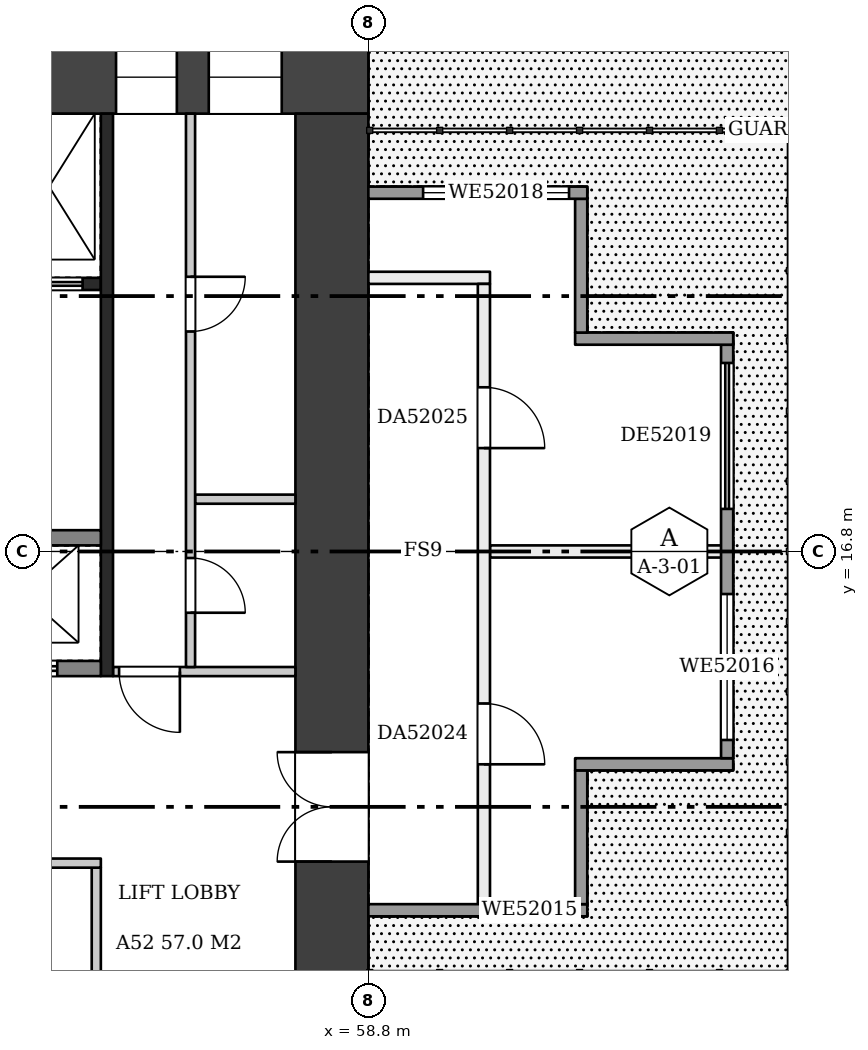
"""IFC4 building model, lengths in metres.
Left out: names, types, materials, properties, quantities, classifications, styles, units other than length and angle.
Written with IfcOpenShell. Run it as: python <this file> out.ifc"""

import sys

from ifc_helpers import new_model, si_unit, direction, frame, frame_2d, origin, place, context, subcontext, project, spatial, rectangle, extrude, element, fill, save


model = new_model("IFC4")
c1 = context("Model", 3, precision=1e-05, world=origin(), true_north=direction((0.0, 1.0)))
c2 = subcontext(c1, "Body", "Model", "MODEL_VIEW")
j1 = project(units=[si_unit("LENGTHUNIT", "METRE"), si_unit("PLANEANGLEUNIT", "RADIAN")], contexts=[c1])
p1 = place(None, origin())
s1 = spatial("IfcSite", under=j1, at=p1, CompositionType="ELEMENT")
p2 = place(p1, origin())
s2 = spatial("IfcBuilding", under=s1, at=p2, CompositionType="ELEMENT")
p3 = place(p2, frame((0.0, 0.0, 200.2)))
s3 = spatial("IfcBuildingStorey", under=s2, at=p3, CompositionType="ELEMENT", Elevation=200.2)
p4 = place(p3, frame((42.0, 24.6, 0.0), z_axis=(0.0, 0.0, 1.0), x_axis=(1.0, 0.0, 0.0)))
e1 = element("IfcWall", 1, at=p4, inside=s3, PredefinedType="SHEAR", context=c2, shape_type="SweptSolid", body=[
    extrude(rectangle(XDim=16.8, YDim=1.2, at=frame_2d((8.4, 0.0))), origin(), (0.0, 0.0, 1.0), 3.22),
])
p5 = place(p4, frame((1.8, 0.0, 0.5)))
e2 = element("IfcOpeningElement", 2, at=p5, cuts=e1, PredefinedType="OPENING", context=c2, shape_type="SweptSolid", body=[
    extrude(rectangle(XDim=1.8, YDim=2.4, at=frame_2d((0.9, 1.2))), frame((0.0, 0.61, 0.0), z_axis=(0.0, -1.0, 0.0), x_axis=(1.0, 0.0, 0.0)), (0.0, 0.0, 1.0), 1.22),
])
p6 = place(p4, frame((4.625, 0.0, 1.6)))
e3 = element("IfcOpeningElement", 3, at=p6, cuts=e1, PredefinedType="OPENING", context=c2, shape_type="SweptSolid", body=[
    extrude(rectangle(XDim=1.8, YDim=1.2, at=frame_2d((0.9, 0.6))), frame((0.0, 0.61, 0.0), z_axis=(0.0, -1.0, 0.0), x_axis=(1.0, 0.0, 0.0)), (0.0, 0.0, 1.0), 1.22),
])
p7 = place(p4, frame((7.05, 0.0, 1.6)))
e4 = element("IfcOpeningElement", 4, at=p7, cuts=e1, PredefinedType="OPENING", context=c2, shape_type="SweptSolid", body=[
    extrude(rectangle(XDim=1.2, YDim=1.2, at=frame_2d((0.6, 0.6))), frame((0.0, 0.61, 0.0), z_axis=(0.0, -1.0, 0.0), x_axis=(1.0, 0.0, 0.0)), (0.0, 0.0, 1.0), 1.22),
])
p8 = place(p4, frame((12.65, 0.0, 0.6)))
e5 = element("IfcOpeningElement", 5, at=p8, cuts=e1, PredefinedType="OPENING", context=c2, shape_type="SweptSolid", body=[
    extrude(rectangle(XDim=1.0, YDim=2.1, at=frame_2d((0.5, 1.05))), frame((0.0, 0.61, 0.0), z_axis=(0.0, -1.0, 0.0), x_axis=(1.0, 0.0, 0.0)), (0.0, 0.0, 1.0), 1.22),
])
p9 = place(p4, frame((14.175, 0.0, 1.6)))
e6 = element("IfcOpeningElement", 6, at=p9, cuts=e1, PredefinedType="OPENING", context=c2, shape_type="SweptSolid", body=[
    extrude(rectangle(XDim=1.2, YDim=1.2, at=frame_2d((0.6, 0.6))), frame((0.0, 0.61, 0.0), z_axis=(0.0, -1.0, 0.0), x_axis=(1.0, 0.0, 0.0)), (0.0, 0.0, 1.0), 1.22),
])
p10 = place(p3, frame((58.2, 9.6, 0.0), z_axis=(0.0, 0.0, 1.0), x_axis=(0.0, 1.0, 0.0)))
e7 = element("IfcWall", 7, at=p10, inside=s3, PredefinedType="SHEAR", context=c2, shape_type="SweptSolid", body=[
    extrude(rectangle(XDim=14.4, YDim=1.2, at=frame_2d((7.2, 0.0))), origin(), (0.0, 0.0, 1.0), 3.22),
])
p11 = place(p10, frame((2.1, 0.0, 0.0)))
e8 = element("IfcOpeningElement", 8, at=p11, cuts=e7, PredefinedType="OPENING", context=c2, shape_type="SweptSolid", body=[
    extrude(rectangle(XDim=1.8, YDim=2.1, at=frame_2d((0.9, 1.05))), frame((0.0, 0.61, 0.0), z_axis=(0.0, -1.0, 0.0), x_axis=(1.0, 0.0, 0.0)), (0.0, 0.0, 1.0), 1.22),
])
p12 = place(p3, frame((54.325, 9.6, 0.0), z_axis=(0.0, 0.0, 1.0), x_axis=(0.0, 1.0, 0.0)))
e9 = element("IfcWall", 9, at=p12, inside=s3, PredefinedType="PARTITIONING", context=c2, shape_type="SweptSolid", body=[
    extrude(rectangle(XDim=2.0, YDim=0.15, at=frame_2d((1.0, 0.0))), origin(), (0.0, 0.0, 1.0), 3.22),
])
p13 = place(p3, frame((46.4, 11.675, 0.0), z_axis=(0.0, 0.0, 1.0), x_axis=(1.0, 0.0, 0.0)))
e10 = element("IfcWall", 10, at=p13, inside=s3, PredefinedType="PARTITIONING", context=c2, shape_type="SweptSolid", body=[
    extrude(rectangle(XDim=8.0, YDim=0.15, at=frame_2d((4.0, 0.0))), origin(), (0.0, 0.0, 1.0), 3.22),
])
p14 = place(p13, frame((1.21, 0.0, 0.0)))
e11 = element("IfcOpeningElement", 11, at=p14, cuts=e10, PredefinedType="OPENING", context=c2, shape_type="SweptSolid", body=[
    extrude(rectangle(XDim=0.9, YDim=2.1, at=frame_2d((0.45, 1.05))), frame((0.0, 0.085, 0.0), z_axis=(0.0, -1.0, 0.0), x_axis=(1.0, 0.0, 0.0)), (0.0, 0.0, 1.0), 0.17),
])
p15 = place(p13, frame((5.135, 0.0, 0.0)))
e12 = element("IfcOpeningElement", 12, at=p15, cuts=e10, PredefinedType="OPENING", context=c2, shape_type="SweptSolid", body=[
    extrude(rectangle(XDim=0.9, YDim=2.1, at=frame_2d((0.45, 1.05))), frame((0.0, 0.085, 0.0), z_axis=(0.0, -1.0, 0.0), x_axis=(1.0, 0.0, 0.0)), (0.0, 0.0, 1.0), 0.17),
])
p16 = place(p3, frame((46.4, 14.875, 0.0), z_axis=(0.0, 0.0, 1.0), x_axis=(1.0, 0.0, 0.0)))
e13 = element("IfcWall", 13, at=p16, inside=s3, PredefinedType="SHEAR", context=c2, shape_type="SweptSolid", body=[
    extrude(rectangle(XDim=8.0, YDim=0.25, at=frame_2d((4.0, 0.0))), origin(), (0.0, 0.0, 1.0), 3.22),
])
p17 = place(p16, frame((0.717, 0.0, 0.0)))
e14 = element("IfcOpeningElement", 14, at=p17, cuts=e13, PredefinedType="OPENING", context=c2, shape_type="SweptSolid", body=[
    extrude(rectangle(XDim=1.1, YDim=2.1, at=frame_2d((0.55, 1.05))), frame((0.0, 0.135, 0.0), z_axis=(0.0, -1.0, 0.0), x_axis=(1.0, 0.0, 0.0)), (0.0, 0.0, 1.0), 0.27),
])
p18 = place(p16, frame((3.45, 0.0, 0.0)))
e15 = element("IfcOpeningElement", 15, at=p18, cuts=e13, PredefinedType="OPENING", context=c2, shape_type="SweptSolid", body=[
    extrude(rectangle(XDim=1.1, YDim=2.1, at=frame_2d((0.55, 1.05))), frame((0.0, 0.135, 0.0), z_axis=(0.0, -1.0, 0.0), x_axis=(1.0, 0.0, 0.0)), (0.0, 0.0, 1.0), 0.27),
])
p19 = place(p16, frame((6.183, 0.0, 0.0)))
e16 = element("IfcOpeningElement", 16, at=p19, cuts=e13, PredefinedType="OPENING", context=c2, shape_type="SweptSolid", body=[
    extrude(rectangle(XDim=1.1, YDim=2.1, at=frame_2d((0.55, 1.05))), frame((0.0, 0.135, 0.0), z_axis=(0.0, -1.0, 0.0), x_axis=(1.0, 0.0, 0.0)), (0.0, 0.0, 1.0), 0.27),
])
p20 = place(p3, frame((46.4, 17.025, 0.0), z_axis=(0.0, 0.0, 1.0), x_axis=(1.0, 0.0, 0.0)))
e17 = element("IfcWall", 17, at=p20, inside=s3, PredefinedType="SHEAR", context=c2, shape_type="SweptSolid", body=[
    extrude(rectangle(XDim=8.0, YDim=0.25, at=frame_2d((4.0, 0.0))), origin(), (0.0, 0.0, 1.0), 3.22),
])
p21 = place(p3, frame((46.4, 21.2, 0.0), z_axis=(0.0, 0.0, 1.0), x_axis=(1.0, 0.0, 0.0)))
e18 = element("IfcWall", 18, at=p21, inside=s3, PredefinedType="SHEAR", context=c2, shape_type="SweptSolid", body=[
    extrude(rectangle(XDim=8.0, YDim=0.2, at=frame_2d((4.0, 0.0))), origin(), (0.0, 0.0, 1.0), 3.22),
])
p22 = place(p21, frame((0.675, 0.0, 0.0)))
e19 = element("IfcOpeningElement", 19, at=p22, cuts=e18, PredefinedType="OPENING", context=c2, shape_type="SweptSolid", body=[
    extrude(rectangle(XDim=0.9, YDim=2.1, at=frame_2d((0.45, 1.05))), frame((0.0, 0.11, 0.0), z_axis=(0.0, -1.0, 0.0), x_axis=(1.0, 0.0, 0.0)), (0.0, 0.0, 1.0), 0.22),
])
p23 = place(p21, frame((2.7, 0.0, 0.0)))
e20 = element("IfcOpeningElement", 20, at=p23, cuts=e18, PredefinedType="OPENING", context=c2, shape_type="SweptSolid", body=[
    extrude(rectangle(XDim=0.9, YDim=2.1, at=frame_2d((0.45, 1.05))), frame((0.0, 0.11, 0.0), z_axis=(0.0, -1.0, 0.0), x_axis=(1.0, 0.0, 0.0)), (0.0, 0.0, 1.0), 0.22),
])
p24 = place(p21, frame((4.55, 0.0, 0.0)))
e21 = element("IfcOpeningElement", 21, at=p24, cuts=e18, PredefinedType="OPENING", context=c2, shape_type="SweptSolid", body=[
    extrude(rectangle(XDim=1.1, YDim=2.1, at=frame_2d((0.55, 1.05))), frame((0.0, 0.11, 0.0), z_axis=(0.0, -1.0, 0.0), x_axis=(1.0, 0.0, 0.0)), (0.0, 0.0, 1.0), 0.22),
])
p25 = place(p21, frame((6.6, 0.0, 0.0)))
e22 = element("IfcOpeningElement", 22, at=p25, cuts=e18, PredefinedType="OPENING", context=c2, shape_type="SweptSolid", body=[
    extrude(rectangle(XDim=1.1, YDim=2.1, at=frame_2d((0.55, 1.05))), frame((0.0, 0.11, 0.0), z_axis=(0.0, -1.0, 0.0), x_axis=(1.0, 0.0, 0.0)), (0.0, 0.0, 1.0), 0.22),
])
p26 = place(p3, frame((54.5, 14.75, 0.0), z_axis=(0.0, 0.0, 1.0), x_axis=(0.0, 1.0, 0.0)))
e23 = element("IfcWall", 23, at=p26, inside=s3, PredefinedType="SHEAR", context=c2, shape_type="SweptSolid", body=[
    extrude(rectangle(XDim=9.25, YDim=0.2, at=frame_2d((4.625, 0.0))), origin(), (0.0, 0.0, 1.0), 3.22),
])
p27 = place(p3, frame((54.6, 14.825, 0.0), z_axis=(0.0, 0.0, 1.0), x_axis=(1.0, 0.0, 0.0)))
e24 = element("IfcWall", 24, at=p27, inside=s3, PredefinedType="PARTITIONING", context=c2, shape_type="SweptSolid", body=[
    extrude(rectangle(XDim=3.0, YDim=0.15, at=frame_2d((1.5, 0.0))), origin(), (0.0, 0.0, 1.0), 3.22),
])
p28 = place(p27, frame((0.1, 0.0, 0.0)))
e25 = element("IfcOpeningElement", 25, at=p28, cuts=e24, PredefinedType="OPENING", context=c2, shape_type="SweptSolid", body=[
    extrude(rectangle(XDim=1.0, YDim=2.1, at=frame_2d((0.5, 1.05))), frame((0.0, 0.085, 0.0), z_axis=(0.0, -1.0, 0.0), x_axis=(1.0, 0.0, 0.0)), (0.0, 0.0, 1.0), 0.17),
])
p29 = place(p3, frame((55.95, 17.66, 0.0), z_axis=(0.0, 0.0, 1.0), x_axis=(1.0, 0.0, 0.0)))
e26 = element("IfcWall", 26, at=p29, inside=s3, PredefinedType="PARTITIONING", context=c2, shape_type="SweptSolid", body=[
    extrude(rectangle(XDim=1.65, YDim=0.15, at=frame_2d((0.825, 0.0))), origin(), (0.0, 0.0, 1.0), 3.22),
])
p30 = place(p3, frame((55.875, 14.9, 0.0), z_axis=(0.0, 0.0, 1.0), x_axis=(0.0, 1.0, 0.0)))
e27 = element("IfcWall", 27, at=p30, inside=s3, PredefinedType="PARTITIONING", context=c2, shape_type="SweptSolid", body=[
    extrude(rectangle(XDim=9.1, YDim=0.15, at=frame_2d((4.55, 0.0))), origin(), (0.0, 0.0, 1.0), 3.22),
])
p31 = place(p30, frame((0.893, 0.0, 0.0)))
e28 = element("IfcOpeningElement", 28, at=p31, cuts=e27, PredefinedType="OPENING", context=c2, shape_type="SweptSolid", body=[
    extrude(rectangle(XDim=0.9, YDim=2.1, at=frame_2d((0.45, 1.05))), frame((0.0, 0.085, 0.0), z_axis=(0.0, -1.0, 0.0), x_axis=(1.0, 0.0, 0.0)), (0.0, 0.0, 1.0), 0.17),
])
p32 = place(p30, frame((5.518, 0.0, 0.0)))
e29 = element("IfcOpeningElement", 29, at=p32, cuts=e27, PredefinedType="OPENING", context=c2, shape_type="SweptSolid", body=[
    extrude(rectangle(XDim=0.9, YDim=2.1, at=frame_2d((0.45, 1.05))), frame((0.0, 0.085, 0.0), z_axis=(0.0, -1.0, 0.0), x_axis=(1.0, 0.0, 0.0)), (0.0, 0.0, 1.0), 0.17),
])
p33 = place(p3, frame((60.8, 16.8, 0.0), z_axis=(0.0, 0.0, 1.0), x_axis=(1.0, 0.0, 0.0)))
e30 = element("IfcWall", 30, at=p33, inside=s3, PredefinedType="PARTITIONING", context=c2, shape_type="SweptSolid", body=[
    extrude(rectangle(XDim=3.9, YDim=0.2, at=frame_2d((1.95, 0.0))), origin(), (0.0, 0.0, 1.0), 3.22),
])
p34 = place(p3, frame((58.8, 21.3, 0.0), z_axis=(0.0, 0.0, 1.0), x_axis=(1.0, 0.0, 0.0)))
e31 = element("IfcWall", 31, at=p34, inside=s3, PredefinedType="PARTITIONING", context=c2, shape_type="SweptSolid", body=[
    extrude(rectangle(XDim=2.0, YDim=0.2, at=frame_2d((1.0, 0.0))), origin(), (0.0, 0.0, 1.0), 3.22),
])
p35 = place(p3, frame((60.7, 10.9, 0.0), z_axis=(0.0, 0.0, 1.0), x_axis=(0.0, 1.0, 0.0)))
e32 = element("IfcWall", 32, at=p35, inside=s3, PredefinedType="PARTITIONING", context=c2, shape_type="SweptSolid", body=[
    extrude(rectangle(XDim=10.3, YDim=0.2, at=frame_2d((5.15, 0.0))), origin(), (0.0, 0.0, 1.0), 3.22),
])
p36 = place(p35, frame((2.4, 0.0, 0.0)))
e33 = element("IfcOpeningElement", 33, at=p36, cuts=e32, PredefinedType="OPENING", context=c2, shape_type="SweptSolid", body=[
    extrude(rectangle(XDim=1.0, YDim=2.1, at=frame_2d((0.5, 1.05))), frame((0.0, 0.11, 0.0), z_axis=(0.0, -1.0, 0.0), x_axis=(1.0, 0.0, 0.0)), (0.0, 0.0, 1.0), 0.22),
])
p37 = place(p35, frame((7.6, 0.0, 0.0)))
e34 = element("IfcOpeningElement", 34, at=p37, cuts=e32, PredefinedType="OPENING", context=c2, shape_type="SweptSolid", body=[
    extrude(rectangle(XDim=1.0, YDim=2.1, at=frame_2d((0.5, 1.05))), frame((0.0, 0.11, 0.0), z_axis=(0.0, -1.0, 0.0), x_axis=(1.0, 0.0, 0.0)), (0.0, 0.0, 1.0), 0.22),
])
p38 = place(p3, frame((58.8, 10.9, 0.0), z_axis=(0.0, 0.0, 1.0), x_axis=(1.0, 0.0, 0.0)))
e35 = element("IfcWall", 35, at=p38, inside=s3, PredefinedType="SOLIDWALL", context=c2, shape_type="SweptSolid", body=[
    extrude(rectangle(XDim=3.6, YDim=0.2, at=frame_2d((1.8, 0.0))), origin(), (0.0, 0.0, 1.0), 3.22),
])
p39 = place(p38, frame((2.0, 0.0, 0.9)))
e36 = element("IfcOpeningElement", 36, at=p39, cuts=e35, PredefinedType="OPENING", context=c2, shape_type="SweptSolid", body=[
    extrude(rectangle(XDim=1.3, YDim=1.5, at=frame_2d((0.65, 0.75))), frame((0.0, 0.11, 0.0), z_axis=(0.0, -1.0, 0.0), x_axis=(1.0, 0.0, 0.0)), (0.0, 0.0, 1.0), 0.22),
])
p40 = place(p3, frame((62.3, 11.0, 0.0), z_axis=(0.0, 0.0, 1.0), x_axis=(0.0, 1.0, 0.0)))
e37 = element("IfcWall", 37, at=p40, inside=s3, PredefinedType="SOLIDWALL", context=c2, shape_type="SweptSolid", body=[
    extrude(rectangle(XDim=2.2, YDim=0.2, at=frame_2d((1.1, 0.0))), origin(), (0.0, 0.0, 1.0), 3.22),
])
p41 = place(p3, frame((62.2, 13.3, 0.0), z_axis=(0.0, 0.0, 1.0), x_axis=(1.0, 0.0, 0.0)))
e38 = element("IfcWall", 38, at=p41, inside=s3, PredefinedType="SOLIDWALL", context=c2, shape_type="SweptSolid", body=[
    extrude(rectangle(XDim=2.6, YDim=0.2, at=frame_2d((1.3, 0.0))), origin(), (0.0, 0.0, 1.0), 3.22),
])
p42 = place(p3, frame((64.7, 13.4, 0.0), z_axis=(0.0, 0.0, 1.0), x_axis=(0.0, 1.0, 0.0)))
e39 = element("IfcWall", 39, at=p42, inside=s3, PredefinedType="SOLIDWALL", context=c2, shape_type="SweptSolid", body=[
    extrude(rectangle(XDim=6.8, YDim=0.2, at=frame_2d((3.4, 0.0))), origin(), (0.0, 0.0, 1.0), 3.22),
])
p43 = place(p42, frame((0.3, 0.0, 0.9)))
e40 = element("IfcOpeningElement", 40, at=p43, cuts=e39, PredefinedType="OPENING", context=c2, shape_type="SweptSolid", body=[
    extrude(rectangle(XDim=2.4, YDim=1.5, at=frame_2d((1.2, 0.75))), frame((0.0, 0.11, 0.0), z_axis=(0.0, -1.0, 0.0), x_axis=(1.0, 0.0, 0.0)), (0.0, 0.0, 1.0), 0.22),
])
p44 = place(p42, frame((4.1, 0.0, 0.0)))
e41 = element("IfcOpeningElement", 41, at=p44, cuts=e39, PredefinedType="OPENING", context=c2, shape_type="SweptSolid", body=[
    extrude(rectangle(XDim=2.4, YDim=2.2, at=frame_2d((1.2, 1.1))), frame((0.0, 0.11, 0.0), z_axis=(0.0, -1.0, 0.0), x_axis=(1.0, 0.0, 0.0)), (0.0, 0.0, 1.0), 0.22),
])
p45 = place(p3, frame((64.8, 20.3, 0.0), z_axis=(0.0, 0.0, 1.0), x_axis=(-1.0, 0.0, 0.0)))
e42 = element("IfcWall", 42, at=p45, inside=s3, PredefinedType="SOLIDWALL", context=c2, shape_type="SweptSolid", body=[
    extrude(rectangle(XDim=2.6, YDim=0.2, at=frame_2d((1.3, 0.0))), origin(), (0.0, 0.0, 1.0), 3.22),
])
p46 = place(p3, frame((62.3, 20.4, 0.0), z_axis=(0.0, 0.0, 1.0), x_axis=(0.0, 1.0, 0.0)))
e43 = element("IfcWall", 43, at=p46, inside=s3, PredefinedType="SOLIDWALL", context=c2, shape_type="SweptSolid", body=[
    extrude(rectangle(XDim=2.2, YDim=0.2, at=frame_2d((1.1, 0.0))), origin(), (0.0, 0.0, 1.0), 3.22),
])
p47 = place(p3, frame((62.4, 22.7, 0.0), z_axis=(0.0, 0.0, 1.0), x_axis=(-1.0, 0.0, 0.0)))
e44 = element("IfcWall", 44, at=p47, inside=s3, PredefinedType="SOLIDWALL", context=c2, shape_type="SweptSolid", body=[
    extrude(rectangle(XDim=3.6, YDim=0.2, at=frame_2d((1.8, 0.0))), origin(), (0.0, 0.0, 1.0), 3.22),
])
p48 = place(p47, frame((0.3, 0.0, 0.9)))
e45 = element("IfcOpeningElement", 45, at=p48, cuts=e44, PredefinedType="OPENING", context=c2, shape_type="SweptSolid", body=[
    extrude(rectangle(XDim=2.4, YDim=1.5, at=frame_2d((1.2, 0.75))), frame((0.0, 0.11, 0.0), z_axis=(0.0, -1.0, 0.0), x_axis=(1.0, 0.0, 0.0)), (0.0, 0.0, 1.0), 0.22),
])
p49 = place(p11, origin())
e46 = element("IfcDoor", 46, at=p49, inside=s3, OperationType="DOUBLE_DOOR_SINGLE_SWING", PredefinedType="DOOR", context=c2, shape_type="SweptSolid", body=[
    extrude(rectangle(XDim=1.8, YDim=2.1, at=frame_2d((0.9, 1.05))), frame((0.0, 0.025, 0.0), z_axis=(0.0, -1.0, 0.0), x_axis=(1.0, 0.0, 0.0)), (0.0, 0.0, 1.0), 0.05),
])
fill(e8, e46)
p50 = place(p19, origin())
e47 = element("IfcDoor", 47, at=p50, inside=s3, OperationType="DOUBLE_DOOR_SLIDING", PredefinedType="DOOR", context=c2, shape_type="SweptSolid", body=[
    extrude(rectangle(XDim=1.1, YDim=2.1, at=frame_2d((0.55, 1.05))), frame((0.0, 0.025, 0.0), z_axis=(0.0, -1.0, 0.0), x_axis=(1.0, 0.0, 0.0)), (0.0, 0.0, 1.0), 0.05),
])
fill(e16, e47)
p51 = place(p25, origin())
e48 = element("IfcDoor", 48, at=p51, inside=s3, OperationType="DOUBLE_DOOR_SLIDING", PredefinedType="DOOR", context=c2, shape_type="SweptSolid", body=[
    extrude(rectangle(XDim=1.1, YDim=2.1, at=frame_2d((0.55, 1.05))), frame((0.0, 0.025, 0.0), z_axis=(0.0, -1.0, 0.0), x_axis=(1.0, 0.0, 0.0)), (0.0, 0.0, 1.0), 0.05),
])
fill(e22, e48)
p52 = place(p28, frame((1.0, 0.0, 0.0), z_axis=(0.0, 0.0, 1.0), x_axis=(-1.0, 0.0, 0.0)))
e49 = element("IfcDoor", 49, at=p52, inside=s3, OperationType="SINGLE_SWING_LEFT", PredefinedType="DOOR", context=c2, shape_type="SweptSolid", body=[
    extrude(rectangle(XDim=1.0, YDim=2.1, at=frame_2d((0.5, 1.05))), frame((0.0, 0.025, 0.0), z_axis=(0.0, -1.0, 0.0), x_axis=(1.0, 0.0, 0.0)), (0.0, 0.0, 1.0), 0.05),
])
fill(e25, e49)
p53 = place(p31, frame((0.9, 0.0, 0.0), z_axis=(0.0, 0.0, 1.0), x_axis=(-1.0, 0.0, 0.0)))
e50 = element("IfcDoor", 50, at=p53, inside=s3, OperationType="SINGLE_SWING_RIGHT", PredefinedType="DOOR", context=c2, shape_type="SweptSolid", body=[
    extrude(rectangle(XDim=0.9, YDim=2.1, at=frame_2d((0.45, 1.05))), frame((0.0, 0.025, 0.0), z_axis=(0.0, -1.0, 0.0), x_axis=(1.0, 0.0, 0.0)), (0.0, 0.0, 1.0), 0.05),
])
fill(e28, e50)
p54 = place(p32, frame((0.9, 0.0, 0.0), z_axis=(0.0, 0.0, 1.0), x_axis=(-1.0, 0.0, 0.0)))
e51 = element("IfcDoor", 51, at=p54, inside=s3, OperationType="SINGLE_SWING_LEFT", PredefinedType="DOOR", context=c2, shape_type="SweptSolid", body=[
    extrude(rectangle(XDim=0.9, YDim=2.1, at=frame_2d((0.45, 1.05))), frame((0.0, 0.025, 0.0), z_axis=(0.0, -1.0, 0.0), x_axis=(1.0, 0.0, 0.0)), (0.0, 0.0, 1.0), 0.05),
])
fill(e29, e51)
p55 = place(p8, origin())
e52 = element("IfcWindow", 52, at=p55, inside=s3, PartitioningType="SINGLE_PANEL", PredefinedType="WINDOW", context=c2, shape_type="SweptSolid", body=[
    extrude(rectangle(XDim=1.0, YDim=2.1, at=frame_2d((0.5, 1.05))), frame((0.0, 0.03, 0.0), z_axis=(0.0, -1.0, 0.0), x_axis=(1.0, 0.0, 0.0)), (0.0, 0.0, 1.0), 0.06),
])
fill(e5, e52)
p56 = place(p9, origin())
e53 = element("IfcWindow", 53, at=p56, inside=s3, PartitioningType="SINGLE_PANEL", PredefinedType="WINDOW", context=c2, shape_type="SweptSolid", body=[
    extrude(rectangle(XDim=1.2, YDim=1.2, at=frame_2d((0.6, 0.6))), frame((0.0, 0.03, 0.0), z_axis=(0.0, -1.0, 0.0), x_axis=(1.0, 0.0, 0.0)), (0.0, 0.0, 1.0), 0.06),
])
fill(e6, e53)
p57 = place(p36, frame((1.0, 0.0, 0.0), z_axis=(0.0, 0.0, 1.0), x_axis=(-1.0, 0.0, 0.0)))
e54 = element("IfcDoor", 54, at=p57, inside=s3, OperationType="SINGLE_SWING_RIGHT", PredefinedType="DOOR", context=c2, shape_type="SweptSolid", body=[
    extrude(rectangle(XDim=1.0, YDim=2.1, at=frame_2d((0.5, 1.05))), frame((0.0, 0.025, 0.0), z_axis=(0.0, -1.0, 0.0), x_axis=(1.0, 0.0, 0.0)), (0.0, 0.0, 1.0), 0.05),
])
fill(e33, e54)
p58 = place(p37, frame((1.0, 0.0, 0.0), z_axis=(0.0, 0.0, 1.0), x_axis=(-1.0, 0.0, 0.0)))
e55 = element("IfcDoor", 55, at=p58, inside=s3, OperationType="SINGLE_SWING_RIGHT", PredefinedType="DOOR", context=c2, shape_type="SweptSolid", body=[
    extrude(rectangle(XDim=1.0, YDim=2.1, at=frame_2d((0.5, 1.05))), frame((0.0, 0.025, 0.0), z_axis=(0.0, -1.0, 0.0), x_axis=(1.0, 0.0, 0.0)), (0.0, 0.0, 1.0), 0.05),
])
fill(e34, e55)
p59 = place(p39, origin())
e56 = element("IfcWindow", 56, at=p59, inside=s3, PartitioningType="SINGLE_PANEL", PredefinedType="WINDOW", context=c2, shape_type="SweptSolid", body=[
    extrude(rectangle(XDim=1.3, YDim=1.5, at=frame_2d((0.65, 0.75))), frame((0.0, 0.03, 0.0), z_axis=(0.0, -1.0, 0.0), x_axis=(1.0, 0.0, 0.0)), (0.0, 0.0, 1.0), 0.06),
])
fill(e36, e56)
p60 = place(p43, origin())
e57 = element("IfcWindow", 57, at=p60, inside=s3, PartitioningType="SINGLE_PANEL", PredefinedType="WINDOW", context=c2, shape_type="SweptSolid", body=[
    extrude(rectangle(XDim=2.4, YDim=1.5, at=frame_2d((1.2, 0.75))), frame((0.0, 0.03, 0.0), z_axis=(0.0, -1.0, 0.0), x_axis=(1.0, 0.0, 0.0)), (0.0, 0.0, 1.0), 0.06),
])
fill(e40, e57)
p61 = place(p48, origin())
e58 = element("IfcWindow", 58, at=p61, inside=s3, PartitioningType="SINGLE_PANEL", PredefinedType="WINDOW", context=c2, shape_type="SweptSolid", body=[
    extrude(rectangle(XDim=2.4, YDim=1.5, at=frame_2d((1.2, 0.75))), frame((0.0, 0.03, 0.0), z_axis=(0.0, -1.0, 0.0), x_axis=(1.0, 0.0, 0.0)), (0.0, 0.0, 1.0), 0.06),
])
fill(e45, e58)
p62 = place(p44, origin())
e59 = element("IfcDoor", 59, at=p62, inside=s3, OperationType="DOUBLE_DOOR_SLIDING", PredefinedType="DOOR", context=c2, shape_type="SweptSolid", body=[
    extrude(rectangle(XDim=2.4, YDim=2.2, at=frame_2d((1.2, 1.1))), frame((0.0, 0.025, 0.0), z_axis=(0.0, -1.0, 0.0), x_axis=(1.0, 0.0, 0.0)), (0.0, 0.0, 1.0), 0.05),
])
fill(e41, e59)
save(model, sys.argv[1])
